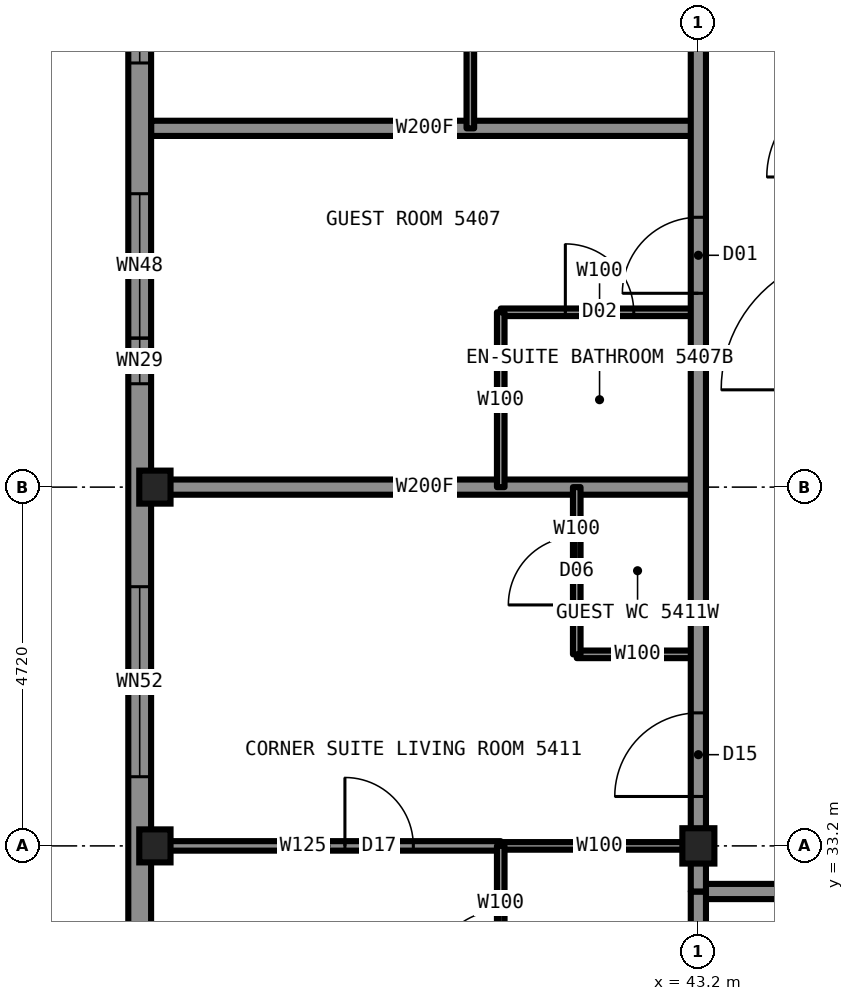
"""IFC4 building model, lengths in metres.
Left out: names, types, materials, properties, quantities, classifications, styles, units other than length and angle.
Written with IfcOpenShell. Run it as: python <this file> out.ifc"""

import sys

from ifc_helpers import new_model, si_unit, direction, frame, frame_2d, origin, origin_2d, place, context, subcontext, project, spatial, rectangle, i_section, extrude, element, fill, save


model = new_model("IFC4")
c1 = context("Model", 3, precision=1e-05, world=origin(), true_north=direction((0.0, 1.0)))
c2 = subcontext(c1, "Body", "Model", "MODEL_VIEW")
j1 = project(units=[si_unit("LENGTHUNIT", "METRE"), si_unit("PLANEANGLEUNIT", "RADIAN")], contexts=[c1])
p1 = place(None, origin())
s1 = spatial("IfcSite", under=j1, at=p1, CompositionType="ELEMENT")
p2 = place(p1, origin())
s2 = spatial("IfcBuilding", under=s1, at=p2, CompositionType="ELEMENT")
p3 = place(p2, frame((0.0, 0.0, 193.3)))
s3 = spatial("IfcBuildingStorey", under=s2, at=p3, CompositionType="ELEMENT", Elevation=193.3)
for number, where, z_axis, x_axis in (
    (1, (36.05, 33.2, 0.0), (0.0, 0.0, 1.0), (1.0, 0.0, 0.0)),
    (2, (36.05, 37.92, 0.0), (0.0, 0.0, 1.0), (1.0, 0.0, 0.0)),
):
    element("IfcColumn", number, at=place(p3, frame(where, z_axis=z_axis, x_axis=x_axis)), inside=s3, PredefinedType="COLUMN", context=c2, shape_type="SweptSolid", body=[
        extrude(i_section(OverallWidth=0.411, OverallDepth=0.434, WebThickness=0.036, FlangeThickness=0.057, at=origin_2d()), origin(), (0.0, 0.0, 1.0), 3.5),
    ])
p4 = place(p3, frame((43.2, 33.2, 0.0), z_axis=(0.0, 0.0, 1.0), x_axis=(1.0, 0.0, 0.0)))
e3 = element("IfcColumn", 3, at=p4, inside=s3, PredefinedType="COLUMN", context=c2, shape_type="SweptSolid", body=[
    extrude(i_section(OverallWidth=0.422, OverallDepth=0.465, WebThickness=0.045, FlangeThickness=0.073, at=origin_2d()), origin(), (0.0, 0.0, 1.0), 3.5),
])
p5 = place(p3, frame((40.6, 33.2, 0.0), z_axis=(0.0, 0.0, 1.0), x_axis=(1.0, 0.0, 0.0)))
e4 = element("IfcWall", 4, at=p5, inside=s3, PredefinedType="PARTITIONING", context=c2, shape_type="SweptSolid", body=[
    extrude(rectangle(XDim=2.6, YDim=0.1, at=frame_2d((1.3, 0.0))), origin(), (0.0, 0.0, 1.0), 2.573),
])
p6 = place(p3, frame((36.0, 33.2, 0.0), z_axis=(0.0, 0.0, 1.0), x_axis=(1.0, 0.0, 0.0)))
e5 = element("IfcWall", 5, at=p6, inside=s3, PredefinedType="PARTITIONING", context=c2, shape_type="SweptSolid", body=[
    extrude(rectangle(XDim=4.6, YDim=0.125, at=frame_2d((2.3, 0.0))), origin(), (0.0, 0.0, 1.0), 2.573),
])
p7 = place(p6, frame((2.55, 0.0, 0.0)))
e6 = element("IfcOpeningElement", 6, at=p7, cuts=e5, PredefinedType="OPENING", context=c2, shape_type="SweptSolid", body=[
    extrude(rectangle(XDim=0.9, YDim=2.2, at=frame_2d((0.45, 1.1))), frame((0.0, 0.073, 0.0), z_axis=(0.0, -1.0, 0.0), x_axis=(1.0, 0.0, 0.0)), (0.0, 0.0, 1.0), 0.145),
])
p8 = place(p3, frame((43.2, 32.6, 0.0), z_axis=(0.0, 0.0, 1.0), x_axis=(1.0, 0.0, 0.0)))
e7 = element("IfcWall", 7, at=p8, inside=s3, PredefinedType="PARTITIONING", context=c2, shape_type="SweptSolid", body=[
    extrude(rectangle(XDim=23.6, YDim=0.2, at=frame_2d((11.8, 0.0))), origin(), (0.0, 0.0, 1.0), 3.33),
])
p9 = place(p8, frame((3.0, 0.0, 0.0)))
e8 = element("IfcOpeningElement", 8, at=p9, cuts=e7, PredefinedType="OPENING", context=c2, shape_type="SweptSolid", body=[
    extrude(rectangle(XDim=1.0, YDim=2.2, at=frame_2d((0.5, 1.1))), frame((0.0, 0.11, 0.0), z_axis=(0.0, -1.0, 0.0), x_axis=(1.0, 0.0, 0.0)), (0.0, 0.0, 1.0), 0.22),
])
p10 = place(p8, frame((11.29, 0.0, 0.0)))
e9 = element("IfcOpeningElement", 9, at=p10, cuts=e7, PredefinedType="OPENING", context=c2, shape_type="SweptSolid", body=[
    extrude(rectangle(XDim=1.1, YDim=2.2, at=frame_2d((0.55, 1.1))), frame((0.0, 0.11, 0.0), z_axis=(0.0, -1.0, 0.0), x_axis=(1.0, 0.0, 0.0)), (0.0, 0.0, 1.0), 0.22),
])
p11 = place(p3, frame((36.0, 42.64, 0.0), z_axis=(0.0, 0.0, 1.0), x_axis=(1.0, 0.0, 0.0)))
e10 = element("IfcWall", 10, at=p11, inside=s3, PredefinedType="PARTITIONING", context=c2, shape_type="SweptSolid", body=[
    extrude(rectangle(XDim=7.2, YDim=0.2, at=frame_2d((3.6, 0.0))), origin(), (0.0, 0.0, 1.0), 2.73),
])
p12 = place(p3, frame((40.6, 40.22, 0.0), z_axis=(0.0, 0.0, 1.0), x_axis=(1.0, 0.0, 0.0)))
e11 = element("IfcWall", 11, at=p12, inside=s3, PredefinedType="PARTITIONING", context=c2, shape_type="SweptSolid", body=[
    extrude(rectangle(XDim=2.6, YDim=0.1, at=frame_2d((1.3, 0.0))), origin(), (0.0, 0.0, 1.0), 2.73),
])
p13 = place(p12, frame((0.85, 0.0, 0.0)))
e12 = element("IfcOpeningElement", 12, at=p13, cuts=e11, PredefinedType="OPENING", context=c2, shape_type="SweptSolid", body=[
    extrude(rectangle(XDim=0.9, YDim=2.1, at=frame_2d((0.45, 1.05))), frame((0.0, 0.06, 0.0), z_axis=(0.0, -1.0, 0.0), x_axis=(1.0, 0.0, 0.0)), (0.0, 0.0, 1.0), 0.12),
])
p14 = place(p3, frame((36.0, 37.92, 0.0), z_axis=(0.0, 0.0, 1.0), x_axis=(1.0, 0.0, 0.0)))
e13 = element("IfcWall", 13, at=p14, inside=s3, PredefinedType="PARTITIONING", context=c2, shape_type="SweptSolid", body=[
    extrude(rectangle(XDim=7.2, YDim=0.2, at=frame_2d((3.6, 0.0))), origin(), (0.0, 0.0, 1.0), 2.573),
])
p15 = place(p3, frame((41.6, 35.72, 0.0), z_axis=(0.0, 0.0, 1.0), x_axis=(1.0, 0.0, 0.0)))
e14 = element("IfcWall", 14, at=p15, inside=s3, PredefinedType="PARTITIONING", context=c2, shape_type="SweptSolid", body=[
    extrude(rectangle(XDim=1.6, YDim=0.1, at=frame_2d((0.8, 0.0))), origin(), (0.0, 0.0, 1.0), 3.33),
])
p16 = place(p3, frame((43.2, 33.22, 0.0), z_axis=(0.0, 0.0, 1.0), x_axis=(0.0, 1.0, 0.0)))
e15 = element("IfcWall", 15, at=p16, inside=s3, PredefinedType="PARTITIONING", context=c2, shape_type="SweptSolid", body=[
    extrude(rectangle(XDim=23.56, YDim=0.2, at=frame_2d((11.78, 0.0))), origin(), (0.0, 0.0, 1.0), 3.33),
])
p17 = place(p16, frame((7.25, 0.0, 0.0)))
e16 = element("IfcOpeningElement", 16, at=p17, cuts=e15, PredefinedType="OPENING", context=c2, shape_type="SweptSolid", body=[
    extrude(rectangle(XDim=1.0, YDim=2.2, at=frame_2d((0.5, 1.1))), frame((0.0, 0.11, 0.0), z_axis=(0.0, -1.0, 0.0), x_axis=(1.0, 0.0, 0.0)), (0.0, 0.0, 1.0), 0.22),
])
p18 = place(p16, frame((12.42, 0.0, 0.0)))
e17 = element("IfcOpeningElement", 17, at=p18, cuts=e15, PredefinedType="OPENING", context=c2, shape_type="SweptSolid", body=[
    extrude(rectangle(XDim=1.0, YDim=2.2, at=frame_2d((0.5, 1.1))), frame((0.0, 0.11, 0.0), z_axis=(0.0, -1.0, 0.0), x_axis=(1.0, 0.0, 0.0)), (0.0, 0.0, 1.0), 0.22),
])
p19 = place(p16, frame((22.03, 0.0, 0.0)))
e18 = element("IfcOpeningElement", 18, at=p19, cuts=e15, PredefinedType="OPENING", context=c2, shape_type="SweptSolid", body=[
    extrude(rectangle(XDim=1.1, YDim=2.2, at=frame_2d((0.55, 1.1))), frame((0.0, 0.11, 0.0), z_axis=(0.0, -1.0, 0.0), x_axis=(1.0, 0.0, 0.0)), (0.0, 0.0, 1.0), 0.22),
])
p20 = place(p16, frame((0.63, 0.0, 0.0)))
e19 = element("IfcOpeningElement", 19, at=p20, cuts=e15, PredefinedType="OPENING", context=c2, shape_type="SweptSolid", body=[
    extrude(rectangle(XDim=1.1, YDim=2.2, at=frame_2d((0.55, 1.1))), frame((0.0, 0.11, 0.0), z_axis=(0.0, -1.0, 0.0), x_axis=(1.0, 0.0, 0.0)), (0.0, 0.0, 1.0), 0.22),
])
p21 = place(p3, frame((43.2, 26.0, 0.0), z_axis=(0.0, 0.0, 1.0), x_axis=(0.0, 1.0, 0.0)))
e20 = element("IfcWall", 20, at=p21, inside=s3, PredefinedType="PARTITIONING", context=c2, shape_type="SweptSolid", body=[
    extrude(rectangle(XDim=6.6, YDim=0.2, at=frame_2d((3.3, 0.0))), origin(), (0.0, 0.0, 1.0), 2.573),
])
p22 = place(p3, frame((41.6, 35.72, 0.0), z_axis=(0.0, 0.0, 1.0), x_axis=(0.0, 1.0, 0.0)))
e21 = element("IfcWall", 21, at=p22, inside=s3, PredefinedType="PARTITIONING", context=c2, shape_type="SweptSolid", body=[
    extrude(rectangle(XDim=2.2, YDim=0.1, at=frame_2d((1.1, 0.0))), origin(), (0.0, 0.0, 1.0), 3.33),
])
p23 = place(p22, frame((0.65, 0.0, 0.0)))
e22 = element("IfcOpeningElement", 22, at=p23, cuts=e21, PredefinedType="OPENING", context=c2, shape_type="SweptSolid", body=[
    extrude(rectangle(XDim=0.9, YDim=2.1, at=frame_2d((0.45, 1.05))), frame((0.0, 0.06, 0.0), z_axis=(0.0, -1.0, 0.0), x_axis=(1.0, 0.0, 0.0)), (0.0, 0.0, 1.0), 0.12),
])
p24 = place(p3, frame((40.6, 30.6, 0.0), z_axis=(0.0, 0.0, 1.0), x_axis=(0.0, 1.0, 0.0)))
e23 = element("IfcWall", 23, at=p24, inside=s3, PredefinedType="PARTITIONING", context=c2, shape_type="SweptSolid", body=[
    extrude(rectangle(XDim=2.6, YDim=0.1, at=frame_2d((1.3, 0.0))), origin(), (0.0, 0.0, 1.0), 3.33),
])
p25 = place(p24, frame((0.85, 0.0, 0.0)))
e24 = element("IfcOpeningElement", 24, at=p25, cuts=e23, PredefinedType="OPENING", context=c2, shape_type="SweptSolid", body=[
    extrude(rectangle(XDim=0.9, YDim=2.1, at=frame_2d((0.45, 1.05))), frame((0.0, 0.06, 0.0), z_axis=(0.0, -1.0, 0.0), x_axis=(1.0, 0.0, 0.0)), (0.0, 0.0, 1.0), 0.12),
])
p26 = place(p3, frame((40.6, 37.92, 0.0), z_axis=(0.0, 0.0, 1.0), x_axis=(0.0, 1.0, 0.0)))
e25 = element("IfcWall", 25, at=p26, inside=s3, PredefinedType="PARTITIONING", context=c2, shape_type="SweptSolid", body=[
    extrude(rectangle(XDim=2.3, YDim=0.1, at=frame_2d((1.15, 0.0))), origin(), (0.0, 0.0, 1.0), 3.33),
])
p27 = place(p3, frame((40.2, 42.64, 0.0), z_axis=(0.0, 0.0, 1.0), x_axis=(0.0, 1.0, 0.0)))
e26 = element("IfcWall", 26, at=p27, inside=s3, PredefinedType="PARTITIONING", context=c2, shape_type="SweptSolid", body=[
    extrude(rectangle(XDim=2.6, YDim=0.1, at=frame_2d((1.3, 0.0))), origin(), (0.0, 0.0, 1.0), 3.33),
])
p28 = place(p3, frame((35.85, 58.8, 0.0), z_axis=(0.0, 0.0, 1.0), x_axis=(0.0, -1.0, 0.0)))
e27 = element("IfcWall", 27, at=p28, inside=s3, PredefinedType="SOLIDWALL", context=c2, shape_type="SweptSolid", body=[
    extrude(rectangle(XDim=27.6, YDim=0.3, at=frame_2d((13.8, 0.0))), origin(), (0.0, 0.0, 1.0), 2.83),
])
p29 = place(p28, frame((2.86, 0.0, 0.3)))
e28 = element("IfcOpeningElement", 28, at=p29, cuts=e27, PredefinedType="OPENING", context=c2, shape_type="SweptSolid", body=[
    extrude(rectangle(XDim=3.0, YDim=2.0, at=frame_2d((1.5, 1.0))), frame((0.0, 0.16, 0.0), z_axis=(0.0, -1.0, 0.0), x_axis=(1.0, 0.0, 0.0)), (0.0, 0.0, 1.0), 0.32),
])
p30 = place(p28, frame((7.58, 0.0, 0.3)))
e29 = element("IfcOpeningElement", 29, at=p30, cuts=e27, PredefinedType="OPENING", context=c2, shape_type="SweptSolid", body=[
    extrude(rectangle(XDim=2.5, YDim=2.0, at=frame_2d((1.25, 1.0))), frame((0.0, 0.16, 0.0), z_axis=(0.0, -1.0, 0.0), x_axis=(1.0, 0.0, 0.0)), (0.0, 0.0, 1.0), 0.32),
])
p31 = place(p28, frame((12.95, 0.0, 1.0)))
e30 = element("IfcOpeningElement", 30, at=p31, cuts=e27, PredefinedType="OPENING", context=c2, shape_type="SweptSolid", body=[
    extrude(rectangle(XDim=1.7, YDim=1.3, at=frame_2d((0.85, 0.65))), frame((0.0, 0.16, 0.0), z_axis=(0.0, -1.0, 0.0), x_axis=(1.0, 0.0, 0.0)), (0.0, 0.0, 1.0), 0.32),
])
p32 = place(p28, frame((17.52, 0.0, 0.3)))
e31 = element("IfcOpeningElement", 31, at=p32, cuts=e27, PredefinedType="OPENING", context=c2, shape_type="SweptSolid", body=[
    extrude(rectangle(XDim=2.5, YDim=2.0, at=frame_2d((1.25, 1.0))), frame((0.0, 0.16, 0.0), z_axis=(0.0, -1.0, 0.0), x_axis=(1.0, 0.0, 0.0)), (0.0, 0.0, 1.0), 0.32),
])
p33 = place(p28, frame((21.74, 0.0, 0.3)))
e32 = element("IfcOpeningElement", 32, at=p33, cuts=e27, PredefinedType="OPENING", context=c2, shape_type="SweptSolid", body=[
    extrude(rectangle(XDim=3.0, YDim=2.0, at=frame_2d((1.5, 1.0))), frame((0.0, 0.16, 0.0), z_axis=(0.0, -1.0, 0.0), x_axis=(1.0, 0.0, 0.0)), (0.0, 0.0, 1.0), 0.32),
])
p34 = place(p3, frame((43.2, 32.6, 0.0), z_axis=(0.0, 0.0, 1.0), x_axis=(0.0, 1.0, 0.0)))
e33 = element("IfcWall", 33, at=p34, inside=s3, PredefinedType="PARTITIONING", context=c2, shape_type="SweptSolid", body=[
    extrude(rectangle(XDim=0.62, YDim=0.2, at=frame_2d((0.31, 0.0))), origin(), (0.0, 0.0, 1.0), 2.573),
])
p35 = place(p17, origin())
e34 = element("IfcDoor", 34, at=p35, inside=s3, OperationType="SINGLE_SWING_LEFT", PredefinedType="DOOR", context=c2, shape_type="SweptSolid", body=[
    extrude(rectangle(XDim=1.0, YDim=2.2, at=frame_2d((0.5, 1.1))), frame((0.0, 0.025, 0.0), z_axis=(0.0, -1.0, 0.0), x_axis=(1.0, 0.0, 0.0)), (0.0, 0.0, 1.0), 0.05),
])
fill(e16, e34)
p36 = place(p13, origin())
e35 = element("IfcDoor", 35, at=p36, inside=s3, OperationType="SINGLE_SWING_RIGHT", PredefinedType="DOOR", context=c2, shape_type="SweptSolid", body=[
    extrude(rectangle(XDim=0.9, YDim=2.1, at=frame_2d((0.45, 1.05))), frame((0.0, 0.025, 0.0), z_axis=(0.0, -1.0, 0.0), x_axis=(1.0, 0.0, 0.0)), (0.0, 0.0, 1.0), 0.05),
])
fill(e12, e35)
p37 = place(p20, origin())
e36 = element("IfcDoor", 36, at=p37, inside=s3, OperationType="SINGLE_SWING_LEFT", PredefinedType="DOOR", context=c2, shape_type="SweptSolid", body=[
    extrude(rectangle(XDim=1.1, YDim=2.2, at=frame_2d((0.55, 1.1))), frame((0.0, 0.025, 0.0), z_axis=(0.0, -1.0, 0.0), x_axis=(1.0, 0.0, 0.0)), (0.0, 0.0, 1.0), 0.05),
])
fill(e19, e36)
p38 = place(p25, origin())
e37 = element("IfcDoor", 37, at=p38, inside=s3, OperationType="SINGLE_SWING_RIGHT", PredefinedType="DOOR", context=c2, shape_type="SweptSolid", body=[
    extrude(rectangle(XDim=0.9, YDim=2.1, at=frame_2d((0.45, 1.05))), frame((0.0, 0.025, 0.0), z_axis=(0.0, -1.0, 0.0), x_axis=(1.0, 0.0, 0.0)), (0.0, 0.0, 1.0), 0.05),
])
fill(e24, e37)
p39 = place(p7, origin())
e38 = element("IfcDoor", 38, at=p39, inside=s3, OperationType="SINGLE_SWING_LEFT", PredefinedType="DOOR", context=c2, shape_type="SweptSolid", body=[
    extrude(rectangle(XDim=0.9, YDim=2.2, at=frame_2d((0.45, 1.1))), frame((0.0, 0.025, 0.0), z_axis=(0.0, -1.0, 0.0), x_axis=(1.0, 0.0, 0.0)), (0.0, 0.0, 1.0), 0.05),
])
fill(e6, e38)
p40 = place(p23, origin())
e39 = element("IfcDoor", 39, at=p40, inside=s3, OperationType="SINGLE_SWING_LEFT", PredefinedType="DOOR", context=c2, shape_type="SweptSolid", body=[
    extrude(rectangle(XDim=0.9, YDim=2.1, at=frame_2d((0.45, 1.05))), frame((0.0, 0.025, 0.0), z_axis=(0.0, -1.0, 0.0), x_axis=(1.0, 0.0, 0.0)), (0.0, 0.0, 1.0), 0.05),
])
fill(e22, e39)
p41 = place(p32, origin())
e40 = element("IfcWindow", 40, at=p41, inside=s3, PartitioningType="SINGLE_PANEL", PredefinedType="WINDOW", context=c2, shape_type="SweptSolid", body=[
    extrude(rectangle(XDim=2.5, YDim=2.0, at=frame_2d((1.25, 1.0))), frame((0.0, 0.13, 0.0), z_axis=(0.0, -1.0, 0.0), x_axis=(1.0, 0.0, 0.0)), (0.0, 0.0, 1.0), 0.06),
])
fill(e31, e40)
p42 = place(p33, origin())
e41 = element("IfcWindow", 41, at=p42, inside=s3, PartitioningType="SINGLE_PANEL", PredefinedType="WINDOW", context=c2, shape_type="SweptSolid", body=[
    extrude(rectangle(XDim=3.0, YDim=2.0, at=frame_2d((1.5, 1.0))), frame((0.0, 0.13, 0.0), z_axis=(0.0, -1.0, 0.0), x_axis=(1.0, 0.0, 0.0)), (0.0, 0.0, 1.0), 0.06),
])
fill(e32, e41)
save(model, sys.argv[1])
